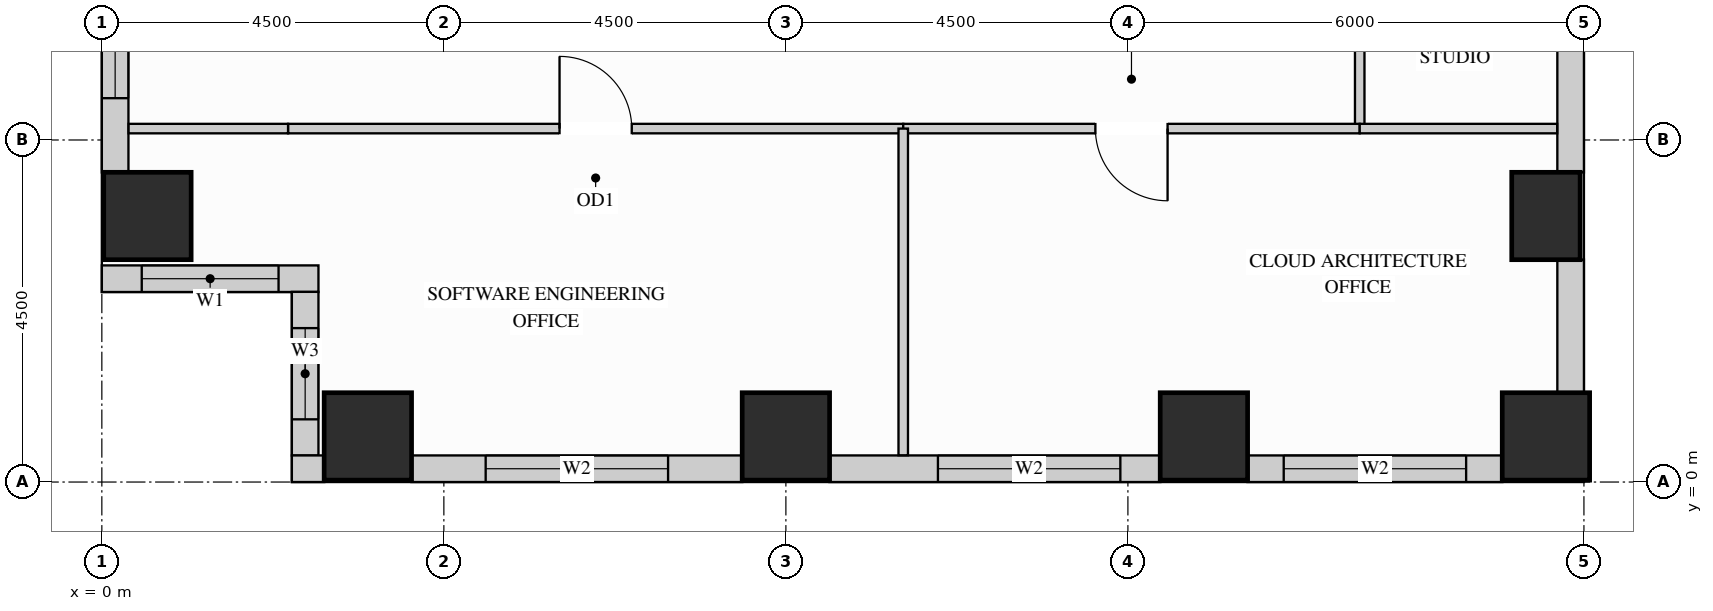
"""IFC4 building model, lengths in metres.
Left out: names, types, materials, properties, quantities, classifications, styles, units other than length and angle.
Written with IfcOpenShell. Run it as: python <this file> out.ifc"""

import sys

from ifc_helpers import new_model, si_unit, direction, frame, frame_2d, origin, origin_2d, place, context, subcontext, project, spatial, rectangle, extrude, source, transform, mapped, element, fill, save


model = new_model("IFC4")
c1 = context("Model", 3, precision=1e-05, world=origin(), true_north=direction((0.0, 1.0)))
c2 = subcontext(c1, "Body", "Model", "MODEL_VIEW")
j1 = project(units=[si_unit("LENGTHUNIT", "METRE"), si_unit("PLANEANGLEUNIT", "RADIAN")], contexts=[c1])
p1 = place(None, origin())
s1 = spatial("IfcSite", under=j1, at=p1, CompositionType="ELEMENT")
p2 = place(p1, origin())
s2 = spatial("IfcBuilding", under=s1, at=p2, CompositionType="ELEMENT")
p3 = place(p2, frame((0.0, 0.0, 102.6)))
s3 = spatial("IfcBuildingStorey", under=s2, at=p3, CompositionType="ELEMENT", Elevation=102.6)
m1 = source(origin(), c2, "Body", "SweptSolid", [
    extrude(rectangle(XDim=0.9, YDim=1.15, at=origin_2d()), origin(), (0.0, 0.0, 1.0), 3.38),
])
p4 = place(p3, frame((19.0, 3.5, 0.0), z_axis=(0.0, 0.0, 1.0), x_axis=(1.0, 0.0, 0.0)))
e1 = element("IfcColumn", 1, at=p4, inside=s3, PredefinedType="COLUMN", context=c2, shape_type="MappedRepresentation", body=[
    mapped(m1, transform((0.0, 0.0, 0.0), x_axis=(1.0, 0.0, 0.0), y_axis=(0.0, 1.0, 0.0), z_axis=(0.0, 0.0, 1.0))),
])
m2 = source(origin(), c2, "Body", "SweptSolid", [
    extrude(rectangle(XDim=1.15, YDim=1.15, at=origin_2d()), origin(), (0.0, 0.0, 1.0), 3.38),
])
for number, where, z_axis, x_axis in (
    (2, (14.5, 0.6, 0.0), (0.0, 0.0, 1.0), (1.0, 0.0, 0.0)),
    (3, (19.0, 0.6, 0.0), (0.0, 0.0, 1.0), (1.0, 0.0, 0.0)),
    (4, (3.5, 0.6, 0.0), (0.0, 0.0, 1.0), (1.0, 0.0, 0.0)),
    (5, (9.0, 0.6, 0.0), (0.0, 0.0, 1.0), (1.0, 0.0, 0.0)),
    (6, (0.6, 3.5, 0.0), (0.0, 0.0, 1.0), (1.0, 0.0, 0.0)),
):
    element("IfcColumn", number, at=place(p3, frame(where, z_axis=z_axis, x_axis=x_axis)), inside=s3, PredefinedType="COLUMN", context=c2, shape_type="MappedRepresentation", body=[
        mapped(m2, transform((0.0, 0.0, 0.0), x_axis=(1.0, 0.0, 0.0), y_axis=(0.0, 1.0, 0.0), z_axis=(0.0, 0.0, 1.0))),
    ])
p5 = place(p3, frame((0.175, 7.927, 0.0), z_axis=(0.0, 0.0, 1.0), x_axis=(0.0, -1.0, 0.0)))
e7 = element("IfcWall", 7, at=p5, inside=s3, PredefinedType="SOLIDWALL", context=c2, shape_type="SweptSolid", body=[
    extrude(rectangle(XDim=3.854, YDim=0.35, at=frame_2d((1.927, 0.0))), origin(), (0.0, 0.0, 1.0), 3.365),
])
p6 = place(p5, frame((0.477, 0.0, 0.78)))
e8 = element("IfcOpeningElement", 8, at=p6, cuts=e7, PredefinedType="OPENING", context=c2, shape_type="SweptSolid", body=[
    extrude(rectangle(XDim=2.4, YDim=2.1, at=frame_2d((1.2, 1.05))), frame((0.0, 0.185, 0.0), z_axis=(0.0, -1.0, 0.0), x_axis=(1.0, 0.0, 0.0)), (0.0, 0.0, 1.0), 0.37),
])
p7 = place(p3, frame((0.0, 2.675, 0.0), z_axis=(0.0, 0.0, 1.0), x_axis=(1.0, 0.0, 0.0)))
e9 = element("IfcWall", 9, at=p7, inside=s3, PredefinedType="SOLIDWALL", context=c2, shape_type="SweptSolid", body=[
    extrude(rectangle(XDim=2.85, YDim=0.35, at=frame_2d((1.425, 0.0))), origin(), (0.0, 0.0, 1.0), 3.365),
])
p8 = place(p7, frame((0.525, 0.0, 0.78)))
e10 = element("IfcOpeningElement", 10, at=p8, cuts=e9, PredefinedType="OPENING", context=c2, shape_type="SweptSolid", body=[
    extrude(rectangle(XDim=1.8, YDim=2.1, at=frame_2d((0.9, 1.05))), frame((0.0, 0.185, 0.0), z_axis=(0.0, -1.0, 0.0), x_axis=(1.0, 0.0, 0.0)), (0.0, 0.0, 1.0), 0.37),
])
p9 = place(p3, frame((2.675, 2.502, 0.0), z_axis=(0.0, 0.0, 1.0), x_axis=(0.0, -1.0, 0.0)))
e11 = element("IfcWall", 11, at=p9, inside=s3, PredefinedType="SOLIDWALL", context=c2, shape_type="SweptSolid", body=[
    extrude(rectangle(XDim=2.154, YDim=0.35, at=frame_2d((1.077, 0.0))), origin(), (0.0, 0.0, 1.0), 3.365),
])
p10 = place(p9, frame((0.477, 0.0, 0.78)))
e12 = element("IfcOpeningElement", 12, at=p10, cuts=e11, PredefinedType="OPENING", context=c2, shape_type="SweptSolid", body=[
    extrude(rectangle(XDim=1.2, YDim=2.1, at=frame_2d((0.6, 1.05))), frame((0.0, 0.185, 0.0), z_axis=(0.0, -1.0, 0.0), x_axis=(1.0, 0.0, 0.0)), (0.0, 0.0, 1.0), 0.37),
])
m3 = source(origin(), c2, "Body", "SweptSolid", [
    extrude(rectangle(XDim=0.427, YDim=0.35, at=frame_2d((0.213, 0.0))), origin(), (0.0, 0.0, 1.0), 3.365),
])
p11 = place(p3, frame((2.5, 0.175, 0.0), z_axis=(0.0, 0.0, 1.0), x_axis=(1.0, 0.0, 0.0)))
e13 = element("IfcWall", 13, at=p11, inside=s3, PredefinedType="SOLIDWALL", context=c2, shape_type="MappedRepresentation", body=[
    mapped(m3, transform((0.0, 0.0, 0.0), x_axis=(1.0, 0.0, 0.0), y_axis=(0.0, 1.0, 0.0), z_axis=(0.0, 0.0, 1.0))),
])
p12 = place(p3, frame((4.073, 0.175, 0.0), z_axis=(0.0, 0.0, 1.0), x_axis=(1.0, 0.0, 0.0)))
e14 = element("IfcWall", 14, at=p12, inside=s3, PredefinedType="SOLIDWALL", context=c2, shape_type="SweptSolid", body=[
    extrude(rectangle(XDim=4.354, YDim=0.35, at=frame_2d((2.177, 0.0))), origin(), (0.0, 0.0, 1.0), 3.365),
])
p13 = place(p12, frame((0.977, 0.0, 0.78)))
e15 = element("IfcOpeningElement", 15, at=p13, cuts=e14, PredefinedType="OPENING", context=c2, shape_type="SweptSolid", body=[
    extrude(rectangle(XDim=2.4, YDim=2.1, at=frame_2d((1.2, 1.05))), frame((0.0, 0.185, 0.0), z_axis=(0.0, -1.0, 0.0), x_axis=(1.0, 0.0, 0.0)), (0.0, 0.0, 1.0), 0.37),
])
p14 = place(p3, frame((9.573, 0.175, 0.0), z_axis=(0.0, 0.0, 1.0), x_axis=(1.0, 0.0, 0.0)))
e16 = element("IfcWall", 16, at=p14, inside=s3, PredefinedType="SOLIDWALL", context=c2, shape_type="SweptSolid", body=[
    extrude(rectangle(XDim=4.354, YDim=0.35, at=frame_2d((2.177, 0.0))), origin(), (0.0, 0.0, 1.0), 3.365),
])
p15 = place(p14, frame((1.427, 0.0, 0.78)))
e17 = element("IfcOpeningElement", 17, at=p15, cuts=e16, PredefinedType="OPENING", context=c2, shape_type="SweptSolid", body=[
    extrude(rectangle(XDim=2.4, YDim=2.1, at=frame_2d((1.2, 1.05))), frame((0.0, 0.185, 0.0), z_axis=(0.0, -1.0, 0.0), x_axis=(1.0, 0.0, 0.0)), (0.0, 0.0, 1.0), 0.37),
])
p16 = place(p3, frame((15.073, 0.175, 0.0), z_axis=(0.0, 0.0, 1.0), x_axis=(1.0, 0.0, 0.0)))
e18 = element("IfcWall", 18, at=p16, inside=s3, PredefinedType="SOLIDWALL", context=c2, shape_type="SweptSolid", body=[
    extrude(rectangle(XDim=3.354, YDim=0.35, at=frame_2d((1.677, 0.0))), origin(), (0.0, 0.0, 1.0), 3.365),
])
p17 = place(p16, frame((0.477, 0.0, 0.78)))
e19 = element("IfcOpeningElement", 19, at=p17, cuts=e18, PredefinedType="OPENING", context=c2, shape_type="SweptSolid", body=[
    extrude(rectangle(XDim=2.4, YDim=2.1, at=frame_2d((1.2, 1.05))), frame((0.0, 0.185, 0.0), z_axis=(0.0, -1.0, 0.0), x_axis=(1.0, 0.0, 0.0)), (0.0, 0.0, 1.0), 0.37),
])
m4 = source(origin(), c2, "Body", "SweptSolid", [
    extrude(rectangle(XDim=1.754, YDim=0.35, at=frame_2d((0.877, 0.0))), origin(), (0.0, 0.0, 1.0), 2.519),
])
p18 = place(p3, frame((19.325, 1.173, 0.0), z_axis=(0.0, 0.0, 1.0), x_axis=(0.0, 1.0, 0.0)))
e20 = element("IfcWall", 20, at=p18, inside=s3, PredefinedType="SOLIDWALL", context=c2, shape_type="MappedRepresentation", body=[
    mapped(m4, transform((0.0, 0.0, 0.0), x_axis=(1.0, 0.0, 0.0), y_axis=(0.0, 1.0, 0.0), z_axis=(0.0, 0.0, 1.0))),
])
m5 = source(origin(), c2, "Body", "SweptSolid", [
    extrude(rectangle(XDim=3.854, YDim=0.35, at=frame_2d((1.927, 0.0))), origin(), (0.0, 0.0, 1.0), 2.519),
])
p19 = place(p3, frame((19.325, 4.073, 0.0), z_axis=(0.0, 0.0, 1.0), x_axis=(0.0, 1.0, 0.0)))
e21 = element("IfcWall", 21, at=p19, inside=s3, PredefinedType="SOLIDWALL", context=c2, shape_type="MappedRepresentation", body=[
    mapped(m5, transform((0.0, 0.0, 0.0), x_axis=(1.0, 0.0, 0.0), y_axis=(0.0, 1.0, 0.0), z_axis=(0.0, 0.0, 1.0))),
])
p20 = place(p3, frame((16.55, 4.65, 0.0), z_axis=(0.0, 0.0, 1.0), x_axis=(0.0, 1.0, 0.0)))
e22 = element("IfcWall", 22, at=p20, inside=s3, PredefinedType="PARTITIONING", context=c2, shape_type="SweptSolid", body=[
    extrude(rectangle(XDim=5.95, YDim=0.125, at=frame_2d((2.975, 0.0))), origin(), (0.0, 0.0, 1.0), 3.365),
])
p21 = place(p20, frame((2.5, 0.0, 0.0)))
e23 = element("IfcOpeningElement", 23, at=p21, cuts=e22, PredefinedType="OPENING", context=c2, shape_type="SweptSolid", body=[
    extrude(rectangle(XDim=0.95, YDim=2.15, at=frame_2d((0.475, 1.075))), frame((0.0, 0.073, 0.0), z_axis=(0.0, -1.0, 0.0), x_axis=(1.0, 0.0, 0.0)), (0.0, 0.0, 1.0), 0.145),
])
p22 = place(p3, frame((2.45, 4.65, 0.0), z_axis=(0.0, 0.0, 1.0), x_axis=(1.0, 0.0, 0.0)))
e24 = element("IfcWall", 24, at=p22, inside=s3, PredefinedType="PARTITIONING", context=c2, shape_type="SweptSolid", body=[
    extrude(rectangle(XDim=8.094, YDim=0.125, at=frame_2d((4.047, 0.0))), origin(), (0.0, 0.0, 1.0), 2.828),
])
p23 = place(p22, frame((3.572, 0.0, 0.0)))
e25 = element("IfcOpeningElement", 25, at=p23, cuts=e24, PredefinedType="OPENING", context=c2, shape_type="SweptSolid", body=[
    extrude(rectangle(XDim=0.95, YDim=2.15, at=frame_2d((0.475, 1.075))), frame((0.0, 0.073, 0.0), z_axis=(0.0, -1.0, 0.0), x_axis=(1.0, 0.0, 0.0)), (0.0, 0.0, 1.0), 0.145),
])
p24 = place(p3, frame((10.544, 4.65, 0.0), z_axis=(0.0, 0.0, 1.0), x_axis=(1.0, 0.0, 0.0)))
e26 = element("IfcWall", 26, at=p24, inside=s3, PredefinedType="PARTITIONING", context=c2, shape_type="SweptSolid", body=[
    extrude(rectangle(XDim=6.006, YDim=0.125, at=frame_2d((3.003, 0.0))), origin(), (0.0, 0.0, 1.0), 2.828),
])
p25 = place(p24, frame((2.528, 0.0, 0.0)))
e27 = element("IfcOpeningElement", 27, at=p25, cuts=e26, PredefinedType="OPENING", context=c2, shape_type="SweptSolid", body=[
    extrude(rectangle(XDim=0.95, YDim=2.15, at=frame_2d((0.475, 1.075))), frame((0.0, 0.073, 0.0), z_axis=(0.0, -1.0, 0.0), x_axis=(1.0, 0.0, 0.0)), (0.0, 0.0, 1.0), 0.145),
])
m6 = source(origin(), c2, "Body", "SweptSolid", [
    extrude(rectangle(XDim=2.098, YDim=0.125, at=frame_2d((1.049, 0.0))), origin(), (0.0, 0.0, 1.0), 2.828),
])
p26 = place(p3, frame((0.352, 4.65, 0.0), z_axis=(0.0, 0.0, 1.0), x_axis=(1.0, 0.0, 0.0)))
e28 = element("IfcWall", 28, at=p26, inside=s3, PredefinedType="PARTITIONING", context=c2, shape_type="MappedRepresentation", body=[
    mapped(m6, transform((0.0, 0.0, 0.0), x_axis=(1.0, 0.0, 0.0), y_axis=(0.0, 1.0, 0.0), z_axis=(0.0, 0.0, 1.0))),
])
m7 = source(origin(), c2, "Body", "SweptSolid", [
    extrude(rectangle(XDim=2.598, YDim=0.125, at=frame_2d((1.299, 0.0))), origin(), (0.0, 0.0, 1.0), 2.828),
])
p27 = place(p3, frame((16.55, 4.65, 0.0), z_axis=(0.0, 0.0, 1.0), x_axis=(1.0, 0.0, 0.0)))
e29 = element("IfcWall", 29, at=p27, inside=s3, PredefinedType="PARTITIONING", context=c2, shape_type="MappedRepresentation", body=[
    mapped(m7, transform((0.0, 0.0, 0.0), x_axis=(1.0, 0.0, 0.0), y_axis=(0.0, 1.0, 0.0), z_axis=(0.0, 0.0, 1.0))),
])
m8 = source(origin(), c2, "Body", "SweptSolid", [
    extrude(rectangle(XDim=4.298, YDim=0.125, at=frame_2d((2.149, 0.0))), origin(), (0.0, 0.0, 1.0), 3.365),
])
p28 = place(p3, frame((10.544, 0.352, 0.0), z_axis=(0.0, 0.0, 1.0), x_axis=(0.0, 1.0, 0.0)))
e30 = element("IfcWall", 30, at=p28, inside=s3, PredefinedType="PARTITIONING", context=c2, shape_type="MappedRepresentation", body=[
    mapped(m8, transform((0.0, 0.0, 0.0), x_axis=(1.0, 0.0, 0.0), y_axis=(0.0, 1.0, 0.0), z_axis=(0.0, 0.0, 1.0))),
])
m9 = source(origin(), c2, "Body", "SweptSolid", [
    extrude(rectangle(XDim=0.95, YDim=2.15, at=frame_2d((0.475, 1.075))), frame((0.0, 0.025, 0.0), z_axis=(0.0, -1.0, 0.0), x_axis=(1.0, 0.0, 0.0)), (0.0, 0.0, 1.0), 0.05),
])
p29 = place(p23, origin())
e31 = element("IfcDoor", 31, at=p29, inside=s3, OperationType="SINGLE_SWING_LEFT", PredefinedType="DOOR", context=c2, shape_type="MappedRepresentation", body=[
    mapped(m9, transform((0.0, 0.0, 0.0), x_axis=(1.0, 0.0, 0.0), y_axis=(0.0, 1.0, 0.0), z_axis=(0.0, 0.0, 1.0))),
])
fill(e25, e31)
p30 = place(p25, origin())
e32 = element("IfcDoor", 32, at=p30, inside=s3, OperationType="SINGLE_SWING_RIGHT", PredefinedType="DOOR", context=c2, shape_type="MappedRepresentation", body=[
    mapped(m9, transform((0.0, 0.0, 0.0), x_axis=(1.0, 0.0, 0.0), y_axis=(0.0, 1.0, 0.0), z_axis=(0.0, 0.0, 1.0))),
])
fill(e27, e32)
m10 = source(origin(), c2, "Body", "SweptSolid", [
    extrude(rectangle(XDim=1.8, YDim=2.1, at=frame_2d((0.9, 1.05))), frame((0.0, 0.03, 0.0), z_axis=(0.0, -1.0, 0.0), x_axis=(1.0, 0.0, 0.0)), (0.0, 0.0, 1.0), 0.06),
])
p31 = place(p8, origin())
e33 = element("IfcWindow", 33, at=p31, inside=s3, PartitioningType="SINGLE_PANEL", PredefinedType="WINDOW", context=c2, shape_type="MappedRepresentation", body=[
    mapped(m10, transform((0.0, 0.0, 0.0), x_axis=(1.0, 0.0, 0.0), y_axis=(0.0, 1.0, 0.0), z_axis=(0.0, 0.0, 1.0))),
])
fill(e10, e33)
m11 = source(origin(), c2, "Body", "SweptSolid", [
    extrude(rectangle(XDim=2.4, YDim=2.1, at=frame_2d((1.2, 1.05))), frame((0.0, 0.03, 0.0), z_axis=(0.0, -1.0, 0.0), x_axis=(1.0, 0.0, 0.0)), (0.0, 0.0, 1.0), 0.06),
])
p32 = place(p6, origin())
e34 = element("IfcWindow", 34, at=p32, inside=s3, PartitioningType="SINGLE_PANEL", PredefinedType="WINDOW", context=c2, shape_type="MappedRepresentation", body=[
    mapped(m11, transform((0.0, 0.0, 0.0), x_axis=(1.0, 0.0, 0.0), y_axis=(0.0, 1.0, 0.0), z_axis=(0.0, 0.0, 1.0))),
])
fill(e8, e34)
p33 = place(p13, origin())
e35 = element("IfcWindow", 35, at=p33, inside=s3, PartitioningType="SINGLE_PANEL", PredefinedType="WINDOW", context=c2, shape_type="MappedRepresentation", body=[
    mapped(m11, transform((0.0, 0.0, 0.0), x_axis=(1.0, 0.0, 0.0), y_axis=(0.0, 1.0, 0.0), z_axis=(0.0, 0.0, 1.0))),
])
fill(e15, e35)
p34 = place(p15, origin())
e36 = element("IfcWindow", 36, at=p34, inside=s3, PartitioningType="SINGLE_PANEL", PredefinedType="WINDOW", context=c2, shape_type="MappedRepresentation", body=[
    mapped(m11, transform((0.0, 0.0, 0.0), x_axis=(1.0, 0.0, 0.0), y_axis=(0.0, 1.0, 0.0), z_axis=(0.0, 0.0, 1.0))),
])
fill(e17, e36)
p35 = place(p17, origin())
e37 = element("IfcWindow", 37, at=p35, inside=s3, PartitioningType="SINGLE_PANEL", PredefinedType="WINDOW", context=c2, shape_type="MappedRepresentation", body=[
    mapped(m11, transform((0.0, 0.0, 0.0), x_axis=(1.0, 0.0, 0.0), y_axis=(0.0, 1.0, 0.0), z_axis=(0.0, 0.0, 1.0))),
])
fill(e19, e37)
m12 = source(origin(), c2, "Body", "SweptSolid", [
    extrude(rectangle(XDim=1.2, YDim=2.1, at=frame_2d((0.6, 1.05))), frame((0.0, 0.03, 0.0), z_axis=(0.0, -1.0, 0.0), x_axis=(1.0, 0.0, 0.0)), (0.0, 0.0, 1.0), 0.06),
])
p36 = place(p10, origin())
e38 = element("IfcWindow", 38, at=p36, inside=s3, PartitioningType="SINGLE_PANEL", PredefinedType="WINDOW", context=c2, shape_type="MappedRepresentation", body=[
    mapped(m12, transform((0.0, 0.0, 0.0), x_axis=(1.0, 0.0, 0.0), y_axis=(0.0, 1.0, 0.0), z_axis=(0.0, 0.0, 1.0))),
])
fill(e12, e38)
save(model, sys.argv[1])
